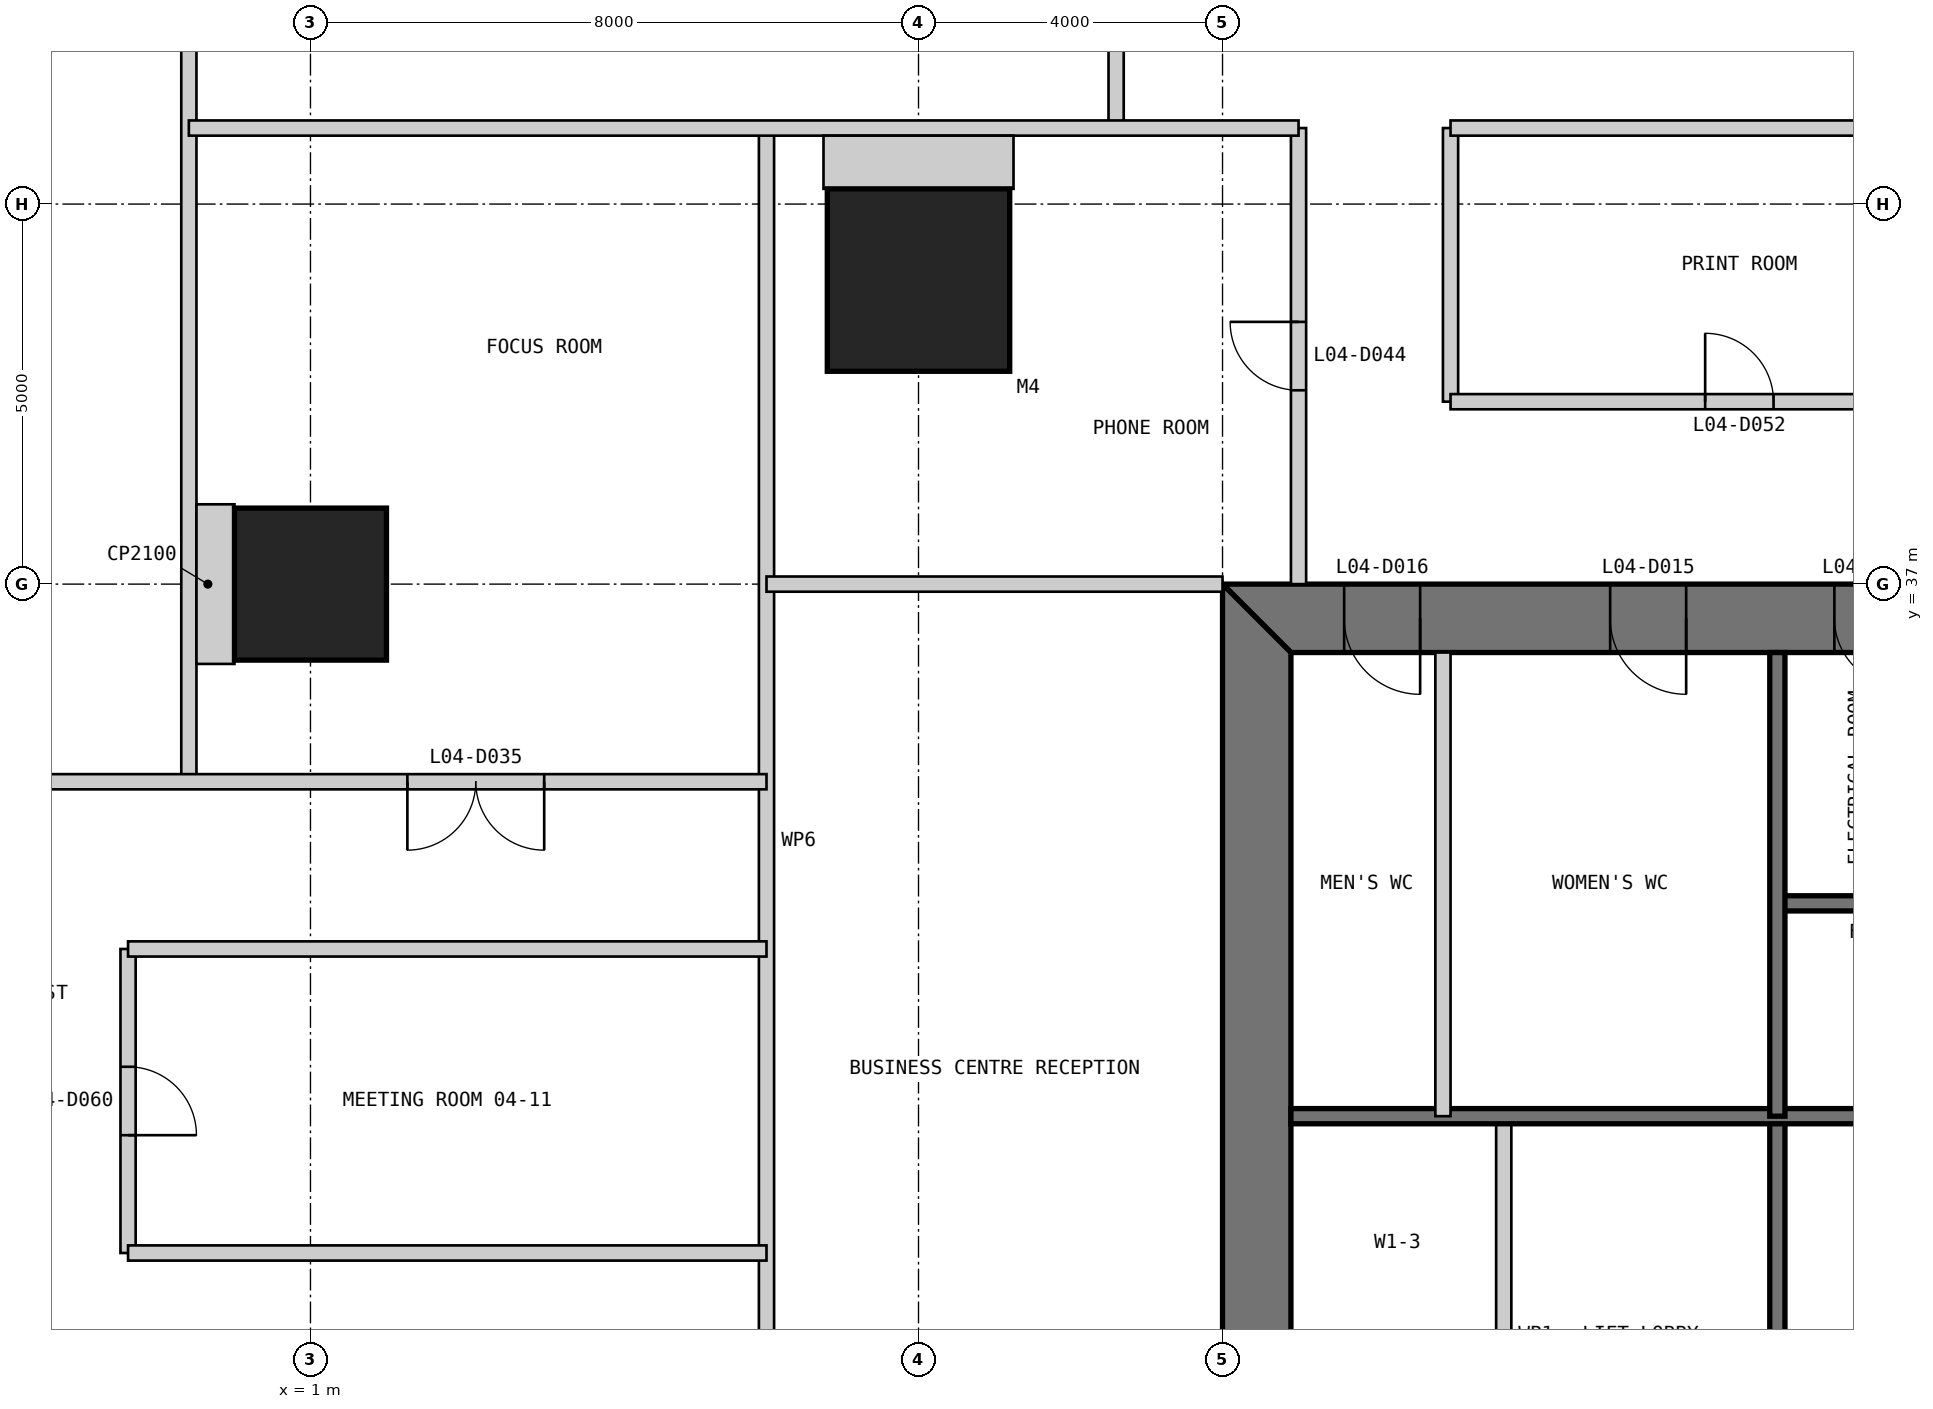
"""IFC4 building model, lengths in metres.
Left out: names, types, materials, properties, quantities, classifications, styles, units other than length and angle.
Written with IfcOpenShell. Run it as: python <this file> out.ifc"""

import sys

from ifc_helpers import new_model, si_unit, direction, frame, frame_2d, origin, origin_2d, place, context, subcontext, project, spatial, polyline, rectangle, outline, extrude, element, fill, save


model = new_model("IFC4")
c1 = context("Model", 3, precision=1e-05, world=origin(), true_north=direction((0.0, 1.0)))
c2 = subcontext(c1, "Body", "Model", "MODEL_VIEW")
j1 = project(units=[si_unit("LENGTHUNIT", "METRE"), si_unit("PLANEANGLEUNIT", "RADIAN")], contexts=[c1])
p1 = place(None, origin())
s1 = spatial("IfcSite", under=j1, at=p1, CompositionType="ELEMENT")
p2 = place(p1, origin())
s2 = spatial("IfcBuilding", under=s1, at=p2, CompositionType="ELEMENT")
p3 = place(p2, frame((0.0, 0.0, 21.4)))
s3 = spatial("IfcBuildingStorey", under=s2, at=p3, CompositionType="ELEMENT", Elevation=21.4)
p4 = place(p3, frame((9.0, 41.0, 0.0), z_axis=(0.0, 0.0, 1.0), x_axis=(1.0, 0.0, 0.0)))
e1 = element("IfcColumn", 1, at=p4, inside=s3, PredefinedType="COLUMN", context=c2, shape_type="SweptSolid", body=[
    extrude(rectangle(XDim=2.4, YDim=2.4, at=origin_2d()), origin(), (0.0, 0.0, 1.0), 4.8),
])
p5 = place(p3, frame((1.0, 37.0, 0.0), z_axis=(0.0, 0.0, 1.0), x_axis=(1.0, 0.0, 0.0)))
e2 = element("IfcColumn", 2, at=p5, inside=s3, PredefinedType="COLUMN", context=c2, shape_type="SweptSolid", body=[
    extrude(rectangle(XDim=2.0, YDim=2.0, at=origin_2d()), origin(), (0.0, 0.0, 1.0), 4.8),
])
p6 = place(p3, frame((37.0, 36.55, 0.0), z_axis=(0.0, 0.0, 1.0), x_axis=(-1.0, 0.0, 0.0)))
e3 = element("IfcWall", 3, at=p6, inside=s3, PredefinedType="SHEAR", context=c2, shape_type="SweptSolid", body=[
    extrude(outline(polyline([(0.0, -0.45), (24.0, -0.45), (23.1, 0.45), (0.9, 0.45), (0.0, -0.45)])), origin(), (0.0, 0.0, 1.0), 4.8),
])
p7 = place(p6, frame((4.9, 0.0, 0.0)))
e4 = element("IfcOpeningElement", 4, at=p7, cuts=e3, PredefinedType="OPENING", context=c2, shape_type="SweptSolid", body=[
    extrude(rectangle(XDim=1.0, YDim=2.2, at=frame_2d((0.5, 1.1))), frame((0.0, 0.46, 0.0), z_axis=(0.0, -1.0, 0.0), x_axis=(1.0, 0.0, 0.0)), (0.0, 0.0, 1.0), 0.92),
])
p8 = place(p6, frame((8.9, 0.0, 0.0)))
e5 = element("IfcOpeningElement", 5, at=p8, cuts=e3, PredefinedType="OPENING", context=c2, shape_type="SweptSolid", body=[
    extrude(rectangle(XDim=1.1, YDim=2.2, at=frame_2d((0.55, 1.1))), frame((0.0, 0.46, 0.0), z_axis=(0.0, -1.0, 0.0), x_axis=(1.0, 0.0, 0.0)), (0.0, 0.0, 1.0), 0.92),
])
p9 = place(p6, frame((15.05, 0.0, 0.0)))
e6 = element("IfcOpeningElement", 6, at=p9, cuts=e3, PredefinedType="OPENING", context=c2, shape_type="SweptSolid", body=[
    extrude(rectangle(XDim=0.9, YDim=2.2, at=frame_2d((0.45, 1.1))), frame((0.0, 0.46, 0.0), z_axis=(0.0, -1.0, 0.0), x_axis=(1.0, 0.0, 0.0)), (0.0, 0.0, 1.0), 0.92),
])
p10 = place(p6, frame((17.9, 0.0, 0.0)))
e7 = element("IfcOpeningElement", 7, at=p10, cuts=e3, PredefinedType="OPENING", context=c2, shape_type="SweptSolid", body=[
    extrude(rectangle(XDim=1.0, YDim=2.2, at=frame_2d((0.5, 1.1))), frame((0.0, 0.46, 0.0), z_axis=(0.0, -1.0, 0.0), x_axis=(1.0, 0.0, 0.0)), (0.0, 0.0, 1.0), 0.92),
])
p11 = place(p6, frame((21.4, 0.0, 0.0)))
e8 = element("IfcOpeningElement", 8, at=p11, cuts=e3, PredefinedType="OPENING", context=c2, shape_type="SweptSolid", body=[
    extrude(rectangle(XDim=1.0, YDim=2.2, at=frame_2d((0.5, 1.1))), frame((0.0, 0.46, 0.0), z_axis=(0.0, -1.0, 0.0), x_axis=(1.0, 0.0, 0.0)), (0.0, 0.0, 1.0), 0.92),
])
p12 = place(p3, frame((13.45, 36.1, 0.0), z_axis=(0.0, 0.0, 1.0), x_axis=(0.0, -1.0, 0.0)))
e9 = element("IfcWall", 9, at=p12, inside=s3, PredefinedType="SHEAR", context=c2, shape_type="SweptSolid", body=[
    extrude(outline(polyline([(-0.9, -0.45), (23.1, -0.45), (22.2, 0.45), (0.0, 0.45), (-0.9, -0.45)])), origin(), (0.0, 0.0, 1.0), 4.8),
])
p13 = place(p12, frame((20.2, 0.0, 0.0)))
e10 = element("IfcOpeningElement", 10, at=p13, cuts=e9, PredefinedType="OPENING", context=c2, shape_type="SweptSolid", body=[
    extrude(rectangle(XDim=1.0, YDim=2.2, at=frame_2d((0.5, 1.1))), frame((0.0, 0.46, 0.0), z_axis=(0.0, -1.0, 0.0), x_axis=(1.0, 0.0, 0.0)), (0.0, 0.0, 1.0), 0.92),
])
p14 = place(p12, frame((17.25, 0.0, 0.0)))
e11 = element("IfcOpeningElement", 11, at=p14, cuts=e9, PredefinedType="OPENING", context=c2, shape_type="SweptSolid", body=[
    extrude(rectangle(XDim=0.9, YDim=2.2, at=frame_2d((0.45, 1.1))), frame((0.0, 0.46, 0.0), z_axis=(0.0, -1.0, 0.0), x_axis=(1.0, 0.0, 0.0)), (0.0, 0.0, 1.0), 0.92),
])
p15 = place(p3, frame((16.7, 13.9, 0.0), z_axis=(0.0, 0.0, 1.0), x_axis=(0.0, 1.0, 0.0)))
e12 = element("IfcWall", 12, at=p15, inside=s3, PredefinedType="PARTITIONING", context=c2, shape_type="SweptSolid", body=[
    extrude(rectangle(XDim=16.1, YDim=0.2, at=frame_2d((8.05, 0.0))), origin(), (0.0, 0.0, 1.0), 4.6),
])
p16 = place(p3, frame((20.3, 13.9, 0.0), z_axis=(0.0, 0.0, 1.0), x_axis=(0.0, 1.0, 0.0)))
e13 = element("IfcWall", 13, at=p16, inside=s3, PredefinedType="SOLIDWALL", context=c2, shape_type="SweptSolid", body=[
    extrude(rectangle(XDim=16.1, YDim=0.2, at=frame_2d((8.05, 0.0))), origin(), (0.0, 0.0, 1.0), 4.6),
])
p17 = place(p3, frame((29.7, 32.8, 0.0), z_axis=(0.0, 0.0, 1.0), x_axis=(-1.0, 0.0, 0.0)))
e14 = element("IfcWall", 14, at=p17, inside=s3, PredefinedType="SOLIDWALL", context=c2, shape_type="SweptSolid", body=[
    extrude(rectangle(XDim=9.4, YDim=0.2, at=frame_2d((4.7, 0.0))), origin(), (0.0, 0.0, 1.0), 4.6),
])
p18 = place(p17, frame((0.25, 0.0, 0.0)))
e15 = element("IfcOpeningElement", 15, at=p18, cuts=e14, PredefinedType="OPENING", context=c2, shape_type="SweptSolid", body=[
    extrude(rectangle(XDim=1.0, YDim=2.2, at=frame_2d((0.5, 1.1))), frame((0.0, 0.11, 0.0), z_axis=(0.0, -1.0, 0.0), x_axis=(1.0, 0.0, 0.0)), (0.0, 0.0, 1.0), 0.22),
])
p19 = place(p3, frame((29.7, 30.0, 0.0), z_axis=(0.0, 0.0, 1.0), x_axis=(-1.0, 0.0, 0.0)))
e16 = element("IfcWall", 16, at=p19, inside=s3, PredefinedType="SOLIDWALL", context=c2, shape_type="SweptSolid", body=[
    extrude(rectangle(XDim=15.8, YDim=0.2, at=frame_2d((7.9, 0.0))), origin(), (0.0, 0.0, 1.0), 4.6),
])
p20 = place(p3, frame((20.3, 36.1, 0.0), z_axis=(0.0, 0.0, 1.0), x_axis=(0.0, -1.0, 0.0)))
e17 = element("IfcWall", 17, at=p20, inside=s3, PredefinedType="SOLIDWALL", context=c2, shape_type="SweptSolid", body=[
    extrude(rectangle(XDim=6.1, YDim=0.2, at=frame_2d((3.05, 0.0))), origin(), (0.0, 0.0, 1.0), 4.6),
])
p21 = place(p3, frame((15.9, 36.1, 0.0), z_axis=(0.0, 0.0, 1.0), x_axis=(0.0, -1.0, 0.0)))
e18 = element("IfcWall", 18, at=p21, inside=s3, PredefinedType="PARTITIONING", context=c2, shape_type="SweptSolid", body=[
    extrude(rectangle(XDim=6.1, YDim=0.2, at=frame_2d((3.05, 0.0))), origin(), (0.0, 0.0, 1.0), 4.6),
])
p22 = place(p3, frame((-1.4, 28.2, 0.0), z_axis=(0.0, 0.0, 1.0), x_axis=(0.0, 1.0, 0.0)))
e19 = element("IfcWall", 19, at=p22, inside=s3, PredefinedType="PARTITIONING", context=c2, shape_type="SweptSolid", body=[
    extrude(rectangle(XDim=4.0, YDim=0.2, at=frame_2d((2.0, 0.0))), origin(), (0.0, 0.0, 1.0), 4.5),
])
p23 = place(p22, frame((1.55, 0.0, 0.0)))
e20 = element("IfcOpeningElement", 20, at=p23, cuts=e19, PredefinedType="OPENING", context=c2, shape_type="SweptSolid", body=[
    extrude(rectangle(XDim=0.9, YDim=2.2, at=frame_2d((0.45, 1.1))), frame((0.0, 0.11, 0.0), z_axis=(0.0, -1.0, 0.0), x_axis=(1.0, 0.0, 0.0)), (0.0, 0.0, 1.0), 0.22),
])
p24 = place(p3, frame((-0.6, 34.4, 0.0), z_axis=(0.0, 0.0, 1.0), x_axis=(0.0, 1.0, 0.0)))
e21 = element("IfcWall", 21, at=p24, inside=s3, PredefinedType="PARTITIONING", context=c2, shape_type="SweptSolid", body=[
    extrude(rectangle(XDim=23.2, YDim=0.2, at=frame_2d((11.6, 0.0))), origin(), (0.0, 0.0, 1.0), 4.5),
])
p25 = place(p3, frame((7.0, 15.0, 0.0), z_axis=(0.0, 0.0, 1.0), x_axis=(0.0, 1.0, 0.0)))
e22 = element("IfcWall", 22, at=p25, inside=s3, PredefinedType="PARTITIONING", context=c2, shape_type="SweptSolid", body=[
    extrude(rectangle(XDim=28.0, YDim=0.2, at=frame_2d((14.0, 0.0))), origin(), (0.0, 0.0, 1.0), 3.843),
])
p26 = place(p3, frame((11.6, 43.0, 0.0), z_axis=(0.0, 0.0, 1.0), x_axis=(0.0, 1.0, 0.0)))
e23 = element("IfcWall", 23, at=p26, inside=s3, PredefinedType="PARTITIONING", context=c2, shape_type="SweptSolid", body=[
    extrude(rectangle(XDim=22.25, YDim=0.2, at=frame_2d((11.125, 0.0))), origin(), (0.0, 0.0, 1.0), 4.5),
])
p27 = place(p26, frame((7.175, 0.0, 0.0)))
e24 = element("IfcOpeningElement", 24, at=p27, cuts=e23, PredefinedType="OPENING", context=c2, shape_type="SweptSolid", body=[
    extrude(rectangle(XDim=1.8, YDim=2.4, at=frame_2d((0.9, 1.2))), frame((0.0, 0.11, 0.0), z_axis=(0.0, -1.0, 0.0), x_axis=(1.0, 0.0, 0.0)), (0.0, 0.0, 1.0), 0.22),
])
p28 = place(p26, frame((17.5, 0.0, 0.0)))
e25 = element("IfcOpeningElement", 25, at=p28, cuts=e23, PredefinedType="OPENING", context=c2, shape_type="SweptSolid", body=[
    extrude(rectangle(XDim=1.8, YDim=2.4, at=frame_2d((0.9, 1.2))), frame((0.0, 0.11, 0.0), z_axis=(0.0, -1.0, 0.0), x_axis=(1.0, 0.0, 0.0)), (0.0, 0.0, 1.0), 0.22),
])
p29 = place(p3, frame((14.0, 37.0, 0.0), z_axis=(0.0, 0.0, 1.0), x_axis=(0.0, 1.0, 0.0)))
e26 = element("IfcWall", 26, at=p29, inside=s3, PredefinedType="PARTITIONING", context=c2, shape_type="SweptSolid", body=[
    extrude(rectangle(XDim=6.0, YDim=0.2, at=frame_2d((3.0, 0.0))), origin(), (0.0, 0.0, 1.0), 4.5),
])
p30 = place(p29, frame((2.55, 0.0, 0.0)))
e27 = element("IfcOpeningElement", 27, at=p30, cuts=e26, PredefinedType="OPENING", context=c2, shape_type="SweptSolid", body=[
    extrude(rectangle(XDim=0.9, YDim=2.2, at=frame_2d((0.45, 1.1))), frame((0.0, 0.11, 0.0), z_axis=(0.0, -1.0, 0.0), x_axis=(1.0, 0.0, 0.0)), (0.0, 0.0, 1.0), 0.22),
])
p31 = place(p3, frame((16.0, 39.4, 0.0), z_axis=(0.0, 0.0, 1.0), x_axis=(0.0, 1.0, 0.0)))
e28 = element("IfcWall", 28, at=p31, inside=s3, PredefinedType="PARTITIONING", context=c2, shape_type="SweptSolid", body=[
    extrude(rectangle(XDim=3.6, YDim=0.2, at=frame_2d((1.8, 0.0))), origin(), (0.0, 0.0, 1.0), 3.843),
])
for number, where, z_axis, x_axis in (
    (29, (-1.4, 28.2, 0.0), (0.0, 0.0, 1.0), (1.0, 0.0, 0.0)),
    (30, (-1.4, 32.2, 0.0), (0.0, 0.0, 1.0), (1.0, 0.0, 0.0)),
):
    element("IfcWall", number, at=place(p3, frame(where, z_axis=z_axis, x_axis=x_axis)), inside=s3, PredefinedType="PARTITIONING", context=c2, shape_type="SweptSolid", body=[
        extrude(rectangle(XDim=8.4, YDim=0.2, at=frame_2d((4.2, 0.0))), origin(), (0.0, 0.0, 1.0), 4.5),
    ])
p32 = place(p3, frame((-7.25, 34.4, 0.0), z_axis=(0.0, 0.0, 1.0), x_axis=(1.0, 0.0, 0.0)))
e31 = element("IfcWall", 31, at=p32, inside=s3, PredefinedType="PARTITIONING", context=c2, shape_type="SweptSolid", body=[
    extrude(rectangle(XDim=14.25, YDim=0.2, at=frame_2d((7.125, 0.0))), origin(), (0.0, 0.0, 1.0), 4.5),
])
p33 = place(p32, frame((9.525, 0.0, 0.0)))
e32 = element("IfcOpeningElement", 32, at=p33, cuts=e31, PredefinedType="OPENING", context=c2, shape_type="SweptSolid", body=[
    extrude(rectangle(XDim=1.8, YDim=2.4, at=frame_2d((0.9, 1.2))), frame((0.0, 0.11, 0.0), z_axis=(0.0, -1.0, 0.0), x_axis=(1.0, 0.0, 0.0)), (0.0, 0.0, 1.0), 0.22),
])
p34 = place(p32, frame((2.45, 0.0, 0.0)))
e33 = element("IfcOpeningElement", 33, at=p34, cuts=e31, PredefinedType="OPENING", context=c2, shape_type="SweptSolid", body=[
    extrude(rectangle(XDim=1.8, YDim=2.4, at=frame_2d((0.9, 1.2))), frame((0.0, 0.11, 0.0), z_axis=(0.0, -1.0, 0.0), x_axis=(1.0, 0.0, 0.0)), (0.0, 0.0, 1.0), 0.22),
])
p35 = place(p3, frame((7.0, 37.0, 0.0), z_axis=(0.0, 0.0, 1.0), x_axis=(1.0, 0.0, 0.0)))
e34 = element("IfcWall", 34, at=p35, inside=s3, PredefinedType="PARTITIONING", context=c2, shape_type="SweptSolid", body=[
    extrude(rectangle(XDim=6.0, YDim=0.2, at=frame_2d((3.0, 0.0))), origin(), (0.0, 0.0, 1.0), 3.653),
])
p36 = place(p3, frame((16.0, 39.4, 0.0), z_axis=(0.0, 0.0, 1.0), x_axis=(1.0, 0.0, 0.0)))
e35 = element("IfcWall", 35, at=p36, inside=s3, PredefinedType="PARTITIONING", context=c2, shape_type="SweptSolid", body=[
    extrude(rectangle(XDim=7.6, YDim=0.2, at=frame_2d((3.8, 0.0))), origin(), (0.0, 0.0, 1.0), 4.5),
])
p37 = place(p36, frame((3.35, 0.0, 0.0)))
e36 = element("IfcOpeningElement", 36, at=p37, cuts=e35, PredefinedType="OPENING", context=c2, shape_type="SweptSolid", body=[
    extrude(rectangle(XDim=0.9, YDim=2.2, at=frame_2d((0.45, 1.1))), frame((0.0, 0.11, 0.0), z_axis=(0.0, -1.0, 0.0), x_axis=(1.0, 0.0, 0.0)), (0.0, 0.0, 1.0), 0.22),
])
p38 = place(p3, frame((-0.6, 43.0, 0.0), z_axis=(0.0, 0.0, 1.0), x_axis=(1.0, 0.0, 0.0)))
e37 = element("IfcWall", 37, at=p38, inside=s3, PredefinedType="PARTITIONING", context=c2, shape_type="SweptSolid", body=[
    extrude(rectangle(XDim=14.6, YDim=0.2, at=frame_2d((7.3, 0.0))), origin(), (0.0, 0.0, 1.0), 4.5),
])
p39 = place(p3, frame((16.0, 43.0, 0.0), z_axis=(0.0, 0.0, 1.0), x_axis=(1.0, 0.0, 0.0)))
e38 = element("IfcWall", 38, at=p39, inside=s3, PredefinedType="PARTITIONING", context=c2, shape_type="SweptSolid", body=[
    extrude(rectangle(XDim=7.6, YDim=0.2, at=frame_2d((3.8, 0.0))), origin(), (0.0, 0.0, 1.0), 4.5),
])
p40 = place(p3, frame((-0.5, 37.0, 0.0), z_axis=(0.0, 0.0, 1.0), x_axis=(1.0, 0.0, 0.0)))
e39 = element("IfcWall", 39, at=p40, inside=s3, PredefinedType="PARTITIONING", context=c2, shape_type="SweptSolid", body=[
    extrude(rectangle(XDim=0.5, YDim=2.1, at=frame_2d((0.25, 0.0))), origin(), (0.0, 0.0, 1.0), 4.5),
])
p41 = place(p3, frame((9.0, 42.9, 0.0), z_axis=(0.0, 0.0, 1.0), x_axis=(0.0, -1.0, 0.0)))
e40 = element("IfcWall", 40, at=p41, inside=s3, PredefinedType="PARTITIONING", context=c2, shape_type="SweptSolid", body=[
    extrude(rectangle(XDim=0.7, YDim=2.5, at=frame_2d((0.35, 0.0))), origin(), (0.0, 0.0, 1.0), 4.5),
])
p42 = place(p9, origin())
e41 = element("IfcDoor", 41, at=p42, inside=s3, OperationType="SINGLE_SWING_LEFT", PredefinedType="DOOR", context=c2, shape_type="SweptSolid", body=[
    extrude(rectangle(XDim=0.9, YDim=2.2, at=frame_2d((0.45, 1.1))), frame((0.0, 0.025, 0.0), z_axis=(0.0, -1.0, 0.0), x_axis=(1.0, 0.0, 0.0)), (0.0, 0.0, 1.0), 0.05),
    extrude(outline(polyline([(0.0, 0.0), (0.04, 0.0), (0.04, 2.16), (0.86, 2.16), (0.86, 0.0), (0.9, 0.0), (0.9, 2.2), (0.0, 2.2), (0.0, 0.0)])), frame((0.0, 0.3, 0.0), z_axis=(0.0, -1.0, 0.0), x_axis=(1.0, 0.0, 0.0)), (0.0, 0.0, 1.0), 0.6),
])
fill(e6, e41)
p43 = place(p10, origin())
e42 = element("IfcDoor", 42, at=p43, inside=s3, OperationType="SINGLE_SWING_LEFT", PredefinedType="DOOR", context=c2, shape_type="SweptSolid", body=[
    extrude(rectangle(XDim=1.0, YDim=2.2, at=frame_2d((0.5, 1.1))), frame((0.0, 0.025, 0.0), z_axis=(0.0, -1.0, 0.0), x_axis=(1.0, 0.0, 0.0)), (0.0, 0.0, 1.0), 0.05),
    extrude(outline(polyline([(0.0, 0.0), (0.04, 0.0), (0.04, 2.16), (0.96, 2.16), (0.96, 0.0), (1.0, 0.0), (1.0, 2.2), (0.0, 2.2), (0.0, 0.0)])), frame((0.0, 0.3, 0.0), z_axis=(0.0, -1.0, 0.0), x_axis=(1.0, 0.0, 0.0)), (0.0, 0.0, 1.0), 0.6),
])
fill(e7, e42)
p44 = place(p11, origin())
e43 = element("IfcDoor", 43, at=p44, inside=s3, OperationType="SINGLE_SWING_LEFT", PredefinedType="DOOR", context=c2, shape_type="SweptSolid", body=[
    extrude(rectangle(XDim=1.0, YDim=2.2, at=frame_2d((0.5, 1.1))), frame((0.0, 0.025, 0.0), z_axis=(0.0, -1.0, 0.0), x_axis=(1.0, 0.0, 0.0)), (0.0, 0.0, 1.0), 0.05),
    extrude(outline(polyline([(0.0, 0.0), (0.04, 0.0), (0.04, 2.16), (0.96, 2.16), (0.96, 0.0), (1.0, 0.0), (1.0, 2.2), (0.0, 2.2), (0.0, 0.0)])), frame((0.0, 0.3, 0.0), z_axis=(0.0, -1.0, 0.0), x_axis=(1.0, 0.0, 0.0)), (0.0, 0.0, 1.0), 0.6),
])
fill(e8, e43)
p45 = place(p33, frame((1.8, 0.0, 0.0), z_axis=(0.0, 0.0, 1.0), x_axis=(-1.0, 0.0, 0.0)))
e44 = element("IfcDoor", 44, at=p45, inside=s3, OperationType="DOUBLE_DOOR_SINGLE_SWING", PredefinedType="DOOR", context=c2, shape_type="SweptSolid", body=[
    extrude(rectangle(XDim=1.8, YDim=2.4, at=frame_2d((0.9, 1.2))), frame((0.0, 0.025, 0.0), z_axis=(0.0, -1.0, 0.0), x_axis=(1.0, 0.0, 0.0)), (0.0, 0.0, 1.0), 0.05),
])
fill(e32, e44)
p46 = place(p30, origin())
e45 = element("IfcDoor", 45, at=p46, inside=s3, OperationType="SINGLE_SWING_RIGHT", PredefinedType="DOOR", context=c2, shape_type="SweptSolid", body=[
    extrude(rectangle(XDim=0.9, YDim=2.2, at=frame_2d((0.45, 1.1))), frame((0.0, 0.025, 0.0), z_axis=(0.0, -1.0, 0.0), x_axis=(1.0, 0.0, 0.0)), (0.0, 0.0, 1.0), 0.05),
])
fill(e27, e45)
p47 = place(p37, origin())
e46 = element("IfcDoor", 46, at=p47, inside=s3, OperationType="SINGLE_SWING_LEFT", PredefinedType="DOOR", context=c2, shape_type="SweptSolid", body=[
    extrude(rectangle(XDim=0.9, YDim=2.2, at=frame_2d((0.45, 1.1))), frame((0.0, 0.025, 0.0), z_axis=(0.0, -1.0, 0.0), x_axis=(1.0, 0.0, 0.0)), (0.0, 0.0, 1.0), 0.05),
])
fill(e36, e46)
p48 = place(p23, frame((0.9, 0.0, 0.0), z_axis=(0.0, 0.0, 1.0), x_axis=(-1.0, 0.0, 0.0)))
e47 = element("IfcDoor", 47, at=p48, inside=s3, OperationType="SINGLE_SWING_RIGHT", PredefinedType="DOOR", context=c2, shape_type="SweptSolid", body=[
    extrude(rectangle(XDim=0.9, YDim=2.2, at=frame_2d((0.45, 1.1))), frame((0.0, 0.025, 0.0), z_axis=(0.0, -1.0, 0.0), x_axis=(1.0, 0.0, 0.0)), (0.0, 0.0, 1.0), 0.05),
])
fill(e20, e47)
save(model, sys.argv[1])
